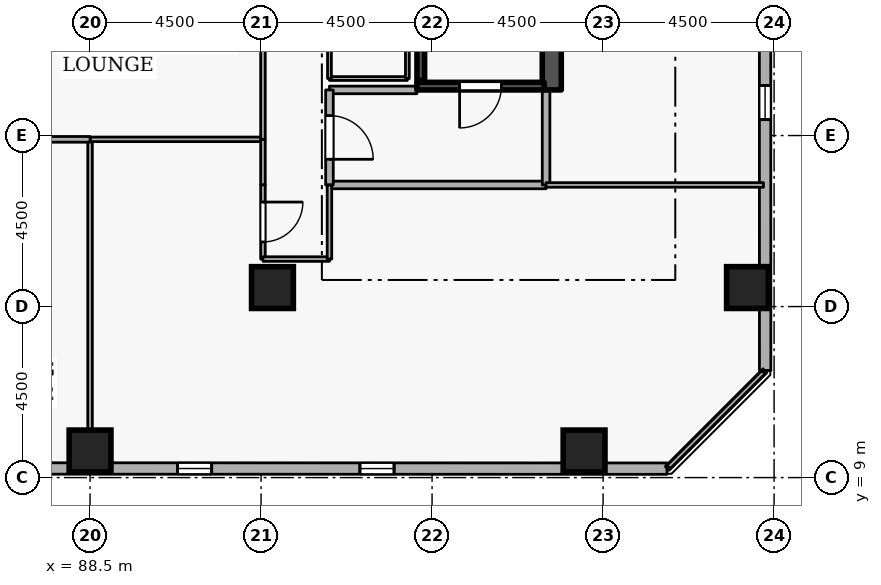
"""IFC4 building model, lengths in metres.
Left out: names, types, materials, properties, quantities, classifications, styles, units other than length and angle.
Written with IfcOpenShell. Run it as: python <this file> out.ifc"""

import sys

from ifc_helpers import new_model, si_unit, direction, frame, frame_2d, origin, origin_2d, place, context, subcontext, project, spatial, rectangle, extrude, element, fill, save


model = new_model("IFC4")
c1 = context("Model", 3, precision=1e-05, world=origin(), true_north=direction((0.0, 1.0)))
c2 = subcontext(c1, "Body", "Model", "MODEL_VIEW")
j1 = project(units=[si_unit("LENGTHUNIT", "METRE"), si_unit("PLANEANGLEUNIT", "RADIAN")], contexts=[c1])
p1 = place(None, origin())
s1 = spatial("IfcSite", under=j1, at=p1, CompositionType="ELEMENT")
p2 = place(p1, origin())
s2 = spatial("IfcBuilding", under=s1, at=p2, CompositionType="ELEMENT")
p3 = place(p2, frame((0.0, 0.0, 189.3)))
s3 = spatial("IfcBuildingStorey", under=s2, at=p3, CompositionType="ELEMENT", Elevation=189.3)
p4 = place(p3, frame((100.65, 19.2, 0.0), z_axis=(0.0, 0.0, 1.0), x_axis=(0.0, 1.0, 0.0)))
e1 = element("IfcWall", 1, at=p4, inside=s3, PredefinedType="SHEAR", context=c2, shape_type="SweptSolid", body=[
    extrude(rectangle(XDim=15.6, YDim=0.5, at=frame_2d((7.8, 0.0))), origin(), (0.0, 0.0, 1.0), 3.6),
])
for number, where, z_axis, x_axis in (
    (2, (105.8, 14.0, 0.0), (0.0, 0.0, 1.0), (1.0, 0.0, 0.0)),
    (3, (101.5, 9.7, 0.0), (0.0, 0.0, 1.0), (1.0, 0.0, 0.0)),
    (4, (88.5, 9.7, 0.0), (0.0, 0.0, 1.0), (1.0, 0.0, 0.0)),
    (5, (93.3, 14.0, 0.0), (0.0, 0.0, 1.0), (1.0, 0.0, 0.0)),
):
    element("IfcColumn", number, at=place(p3, frame(where, z_axis=z_axis, x_axis=x_axis)), inside=s3, PredefinedType="COLUMN", context=c2, shape_type="SweptSolid", body=[
        extrude(rectangle(XDim=1.1, YDim=1.1, at=origin_2d()), origin(), (0.0, 0.0, 1.0), 3.6),
    ])
p5 = place(p3, frame((69.801, 9.244, 0.0), z_axis=(0.0, 0.0, 1.0), x_axis=(0.999999969988, -0.000244999128, 0.0)))
e6 = element("IfcWall", 6, at=p5, inside=s3, PredefinedType="STANDARD", context=c2, shape_type="SweptSolid", body=[
    extrude(rectangle(XDim=33.881, YDim=0.3, at=frame_2d((16.94, 0.0))), origin(), (0.0, 0.0, 1.0), 2.7),
])
p6 = place(p5, frame((1.8, 0.0, 0.72)))
e7 = element("IfcOpeningElement", 7, at=p6, cuts=e6, PredefinedType="OPENING", context=c2, shape_type="SweptSolid", body=[
    extrude(rectangle(XDim=0.9, YDim=1.75, at=frame_2d((0.45, 0.875))), frame((0.0, 0.16, 0.0), z_axis=(0.0, -1.0, 0.0), x_axis=(1.0, 0.0, 0.0)), (0.0, 0.0, 1.0), 0.32),
])
p7 = place(p5, frame((11.4, 0.0, 0.72)))
e8 = element("IfcOpeningElement", 8, at=p7, cuts=e6, PredefinedType="OPENING", context=c2, shape_type="SweptSolid", body=[
    extrude(rectangle(XDim=0.9, YDim=1.75, at=frame_2d((0.45, 0.875))), frame((0.0, 0.16, 0.0), z_axis=(0.0, -1.0, 0.0), x_axis=(1.0, 0.0, 0.0)), (0.0, 0.0, 1.0), 0.32),
])
p8 = place(p5, frame((16.2, 0.0, 0.72)))
e9 = element("IfcOpeningElement", 9, at=p8, cuts=e6, PredefinedType="OPENING", context=c2, shape_type="SweptSolid", body=[
    extrude(rectangle(XDim=0.9, YDim=1.75, at=frame_2d((0.45, 0.875))), frame((0.0, 0.16, 0.0), z_axis=(0.0, -1.0, 0.0), x_axis=(1.0, 0.0, 0.0)), (0.0, 0.0, 1.0), 0.32),
])
p9 = place(p5, frame((21.0, 0.0, 0.72)))
e10 = element("IfcOpeningElement", 10, at=p9, cuts=e6, PredefinedType="OPENING", context=c2, shape_type="SweptSolid", body=[
    extrude(rectangle(XDim=0.9, YDim=1.75, at=frame_2d((0.45, 0.875))), frame((0.0, 0.16, 0.0), z_axis=(0.0, -1.0, 0.0), x_axis=(1.0, 0.0, 0.0)), (0.0, 0.0, 1.0), 0.32),
])
p10 = place(p5, frame((25.8, 0.0, 0.72)))
e11 = element("IfcOpeningElement", 11, at=p10, cuts=e6, PredefinedType="OPENING", context=c2, shape_type="SweptSolid", body=[
    extrude(rectangle(XDim=0.9, YDim=1.75, at=frame_2d((0.45, 0.875))), frame((0.0, 0.16, 0.0), z_axis=(0.0, -1.0, 0.0), x_axis=(1.0, 0.0, 0.0)), (0.0, 0.0, 1.0), 0.32),
])
p11 = place(p3, frame((106.265, 11.819, 0.0), z_axis=(0.0, 0.0, 1.0), x_axis=(-0.000244999128, 0.999999969988, 0.0)))
e12 = element("IfcWall", 12, at=p11, inside=s3, PredefinedType="STANDARD", context=c2, shape_type="SweptSolid", body=[
    extrude(rectangle(XDim=33.881, YDim=0.3, at=frame_2d((16.94, 0.0))), origin(), (0.0, 0.0, 1.0), 2.7),
])
p12 = place(p11, frame((6.6, 0.0, 0.72)))
e13 = element("IfcOpeningElement", 13, at=p12, cuts=e12, PredefinedType="OPENING", context=c2, shape_type="SweptSolid", body=[
    extrude(rectangle(XDim=0.9, YDim=1.75, at=frame_2d((0.45, 0.875))), frame((0.0, 0.16, 0.0), z_axis=(0.0, -1.0, 0.0), x_axis=(1.0, 0.0, 0.0)), (0.0, 0.0, 1.0), 0.32),
])
p13 = place(p11, frame((11.4, 0.0, 0.72)))
e14 = element("IfcOpeningElement", 14, at=p13, cuts=e12, PredefinedType="OPENING", context=c2, shape_type="SweptSolid", body=[
    extrude(rectangle(XDim=0.9, YDim=1.75, at=frame_2d((0.45, 0.875))), frame((0.0, 0.16, 0.0), z_axis=(0.0, -1.0, 0.0), x_axis=(1.0, 0.0, 0.0)), (0.0, 0.0, 1.0), 0.32),
])
p14 = place(p11, frame((21.0, 0.0, 0.72)))
e15 = element("IfcOpeningElement", 15, at=p14, cuts=e12, PredefinedType="OPENING", context=c2, shape_type="SweptSolid", body=[
    extrude(rectangle(XDim=0.9, YDim=1.75, at=frame_2d((0.45, 0.875))), frame((0.0, 0.16, 0.0), z_axis=(0.0, -1.0, 0.0), x_axis=(1.0, 0.0, 0.0)), (0.0, 0.0, 1.0), 0.32),
])
p15 = place(p11, frame((25.8, 0.0, 0.72)))
e16 = element("IfcOpeningElement", 16, at=p15, cuts=e12, PredefinedType="OPENING", context=c2, shape_type="SweptSolid", body=[
    extrude(rectangle(XDim=0.9, YDim=1.75, at=frame_2d((0.45, 0.875))), frame((0.0, 0.16, 0.0), z_axis=(0.0, -1.0, 0.0), x_axis=(1.0, 0.0, 0.0)), (0.0, 0.0, 1.0), 0.32),
])
p16 = place(p11, frame((30.6, 0.0, 0.72)))
e17 = element("IfcOpeningElement", 17, at=p16, cuts=e12, PredefinedType="OPENING", context=c2, shape_type="SweptSolid", body=[
    extrude(rectangle(XDim=0.9, YDim=1.75, at=frame_2d((0.45, 0.875))), frame((0.0, 0.16, 0.0), z_axis=(0.0, -1.0, 0.0), x_axis=(1.0, 0.0, 0.0)), (0.0, 0.0, 1.0), 0.32),
])
p17 = place(p3, frame((100.45, 19.3, 0.0), z_axis=(0.0, 0.0, 1.0), x_axis=(-1.0, 0.0, 0.0)))
e18 = element("IfcWall", 18, at=p17, inside=s3, PredefinedType="SHEAR", context=c2, shape_type="SweptSolid", body=[
    extrude(rectangle(XDim=3.35, YDim=0.2, at=frame_2d((1.675, 0.0))), origin(), (0.0, 0.0, 1.0), 3.6),
])
p18 = place(p17, frame((1.125, 0.0, 0.0)))
e19 = element("IfcOpeningElement", 19, at=p18, cuts=e18, PredefinedType="OPENING", context=c2, shape_type="SweptSolid", body=[
    extrude(rectangle(XDim=1.1, YDim=2.1, at=frame_2d((0.55, 1.05))), frame((0.0, 0.11, 0.0), z_axis=(0.0, -1.0, 0.0), x_axis=(1.0, 0.0, 0.0)), (0.0, 0.0, 1.0), 0.22),
])
p19 = place(p3, frame((97.203, 26.55, 0.0), z_axis=(0.0, 0.0, 1.0), x_axis=(0.0, -1.0, 0.0)))
e20 = element("IfcWall", 20, at=p19, inside=s3, PredefinedType="SHEAR", context=c2, shape_type="SweptSolid", body=[
    extrude(rectangle(XDim=7.1, YDim=0.2, at=frame_2d((3.55, 0.0))), origin(), (0.0, 0.0, 1.0), 3.6),
])
p20 = place(p3, frame((94.8, 16.7, 0.0), z_axis=(0.0, 0.0, 1.0), x_axis=(1.0, 0.0, 0.0)))
e21 = element("IfcWall", 21, at=p20, inside=s3, PredefinedType="STANDARD", context=c2, shape_type="SweptSolid", body=[
    extrude(rectangle(XDim=5.7, YDim=0.2, at=frame_2d((2.85, 0.0))), origin(), (0.0, 0.0, 1.0), 3.34),
])
p21 = place(p3, frame((100.5, 16.7, 0.0), z_axis=(0.0, 0.0, 1.0), x_axis=(0.0, 1.0, 0.0)))
e22 = element("IfcWall", 22, at=p21, inside=s3, PredefinedType="STANDARD", context=c2, shape_type="SweptSolid", body=[
    extrude(rectangle(XDim=2.5, YDim=0.2, at=frame_2d((1.25, 0.0))), origin(), (0.0, 0.0, 1.0), 3.34),
])
p22 = place(p3, frame((97.1, 19.2, 0.0), z_axis=(0.0, 0.0, 1.0), x_axis=(-1.0, 0.0, 0.0)))
e23 = element("IfcWall", 23, at=p22, inside=s3, PredefinedType="STANDARD", context=c2, shape_type="SweptSolid", body=[
    extrude(rectangle(XDim=2.3, YDim=0.2, at=frame_2d((1.15, 0.0))), origin(), (0.0, 0.0, 1.0), 2.545),
])
p23 = place(p3, frame((94.8, 19.2, 0.0), z_axis=(0.0, 0.0, 1.0), x_axis=(0.0, -1.0, 0.0)))
e24 = element("IfcWall", 24, at=p23, inside=s3, PredefinedType="STANDARD", context=c2, shape_type="SweptSolid", body=[
    extrude(rectangle(XDim=2.5, YDim=0.2, at=frame_2d((1.25, 0.0))), origin(), (0.0, 0.0, 1.0), 3.34),
])
p24 = place(p23, frame((0.675, 0.0, 0.0)))
e25 = element("IfcOpeningElement", 25, at=p24, cuts=e24, PredefinedType="OPENING", context=c2, shape_type="SweptSolid", body=[
    extrude(rectangle(XDim=1.15, YDim=2.1, at=frame_2d((0.575, 1.05))), frame((0.0, 0.11, 0.0), z_axis=(0.0, -1.0, 0.0), x_axis=(1.0, 0.0, 0.0)), (0.0, 0.0, 1.0), 0.22),
])
p25 = place(p3, frame((94.8, 19.5, 0.0), z_axis=(0.0, 0.0, 1.0), x_axis=(1.0, 0.0, 0.0)))
e26 = element("IfcWall", 26, at=p25, inside=s3, PredefinedType="PARTITIONING", context=c2, shape_type="SweptSolid", body=[
    extrude(rectangle(XDim=2.05, YDim=0.1, at=frame_2d((1.025, 0.0))), origin(), (0.0, 0.0, 1.0), 2.545),
])
p26 = place(p3, frame((96.85, 19.5, 0.0), z_axis=(0.0, 0.0, 1.0), x_axis=(0.0, 1.0, 0.0)))
e27 = element("IfcWall", 27, at=p26, inside=s3, PredefinedType="PARTITIONING", context=c2, shape_type="SweptSolid", body=[
    extrude(rectangle(XDim=2.6, YDim=0.1, at=frame_2d((1.3, 0.0))), origin(), (0.0, 0.0, 1.0), 3.34),
])
p27 = place(p3, frame((94.8, 22.1, 0.0), z_axis=(0.0, 0.0, 1.0), x_axis=(0.0, -1.0, 0.0)))
e28 = element("IfcWall", 28, at=p27, inside=s3, PredefinedType="PARTITIONING", context=c2, shape_type="SweptSolid", body=[
    extrude(rectangle(XDim=2.6, YDim=0.1, at=frame_2d((1.3, 0.0))), origin(), (0.0, 0.0, 1.0), 3.34),
])
p28 = place(p27, frame((0.825, 0.0, 0.0)))
e29 = element("IfcOpeningElement", 29, at=p28, cuts=e28, PredefinedType="OPENING", context=c2, shape_type="SweptSolid", body=[
    extrude(rectangle(XDim=0.95, YDim=2.1, at=frame_2d((0.475, 1.05))), frame((0.0, 0.06, 0.0), z_axis=(0.0, -1.0, 0.0), x_axis=(1.0, 0.0, 0.0)), (0.0, 0.0, 1.0), 0.12),
])
p29 = place(p3, frame((88.5, 9.28, 0.0), z_axis=(0.0, 0.0, 1.0), x_axis=(0.0, 1.0, 0.0)))
e30 = element("IfcWall", 30, at=p29, inside=s3, PredefinedType="PARTITIONING", context=c2, shape_type="SweptSolid", body=[
    extrude(rectangle(XDim=8.62, YDim=0.12, at=frame_2d((4.31, 0.0))), origin(), (0.0, 0.0, 1.0), 2.878),
])
p30 = place(p3, frame((88.5, 17.9, 0.0), z_axis=(0.0, 0.0, 1.0), x_axis=(1.0, 0.0, 0.0)))
e31 = element("IfcWall", 31, at=p30, inside=s3, PredefinedType="PARTITIONING", context=c2, shape_type="SweptSolid", body=[
    extrude(rectangle(XDim=4.55, YDim=0.12, at=frame_2d((2.275, 0.0))), origin(), (0.0, 0.0, 1.0), 3.34),
])
p31 = place(p3, frame((93.05, 17.9, 0.0), z_axis=(0.0, 0.0, 1.0), x_axis=(0.0, -1.0, 0.0)))
e32 = element("IfcWall", 32, at=p31, inside=s3, PredefinedType="PARTITIONING", context=c2, shape_type="SweptSolid", body=[
    extrude(rectangle(XDim=1.2, YDim=0.12, at=frame_2d((0.6, 0.0))), origin(), (0.0, 0.0, 1.0), 3.34),
])
p32 = place(p3, frame((93.05, 16.7, 0.0), z_axis=(0.0, 0.0, 1.0), x_axis=(0.0, -1.0, 0.0)))
e33 = element("IfcWall", 33, at=p32, inside=s3, PredefinedType="PARTITIONING", context=c2, shape_type="SweptSolid", body=[
    extrude(rectangle(XDim=1.95, YDim=0.12, at=frame_2d((0.975, 0.0))), origin(), (0.0, 0.0, 1.0), 3.34),
])
p33 = place(p32, frame((0.45, 0.0, 0.0)))
e34 = element("IfcOpeningElement", 34, at=p33, cuts=e33, PredefinedType="OPENING", context=c2, shape_type="SweptSolid", body=[
    extrude(rectangle(XDim=1.05, YDim=2.1, at=frame_2d((0.525, 1.05))), frame((0.0, 0.07, 0.0), z_axis=(0.0, -1.0, 0.0), x_axis=(1.0, 0.0, 0.0)), (0.0, 0.0, 1.0), 0.14),
])
p34 = place(p3, frame((93.05, 14.75, 0.0), z_axis=(0.0, 0.0, 1.0), x_axis=(1.0, 0.0, 0.0)))
e35 = element("IfcWall", 35, at=p34, inside=s3, PredefinedType="PARTITIONING", context=c2, shape_type="SweptSolid", body=[
    extrude(rectangle(XDim=1.75, YDim=0.12, at=frame_2d((0.875, 0.0))), origin(), (0.0, 0.0, 1.0), 3.34),
])
p35 = place(p3, frame((94.8, 14.75, 0.0), z_axis=(0.0, 0.0, 1.0), x_axis=(0.0, 1.0, 0.0)))
e36 = element("IfcWall", 36, at=p35, inside=s3, PredefinedType="PARTITIONING", context=c2, shape_type="SweptSolid", body=[
    extrude(rectangle(XDim=1.95, YDim=0.12, at=frame_2d((0.975, 0.0))), origin(), (0.0, 0.0, 1.0), 3.34),
])
p36 = place(p3, frame((100.5, 16.7, 0.0), z_axis=(0.0, 0.0, 1.0), x_axis=(1.0, 0.0, 0.0)))
e37 = element("IfcWall", 37, at=p36, inside=s3, PredefinedType="PARTITIONING", context=c2, shape_type="SweptSolid", body=[
    extrude(rectangle(XDim=5.72, YDim=0.12, at=frame_2d((2.86, 0.0))), origin(), (0.0, 0.0, 1.0), 3.34),
])
p37 = place(p3, frame((106.22, 11.775, 0.0), z_axis=(0.0, 0.0, 1.0), x_axis=(-0.707106781187, -0.707106781187, 0.0)))
e38 = element("IfcWall", 38, at=p37, inside=s3, PredefinedType="PARTITIONING", context=c2, shape_type="SweptSolid", body=[
    extrude(rectangle(XDim=3.528, YDim=0.12, at=frame_2d((1.764, 0.0))), origin(), (0.0, 0.0, 1.0), 3.34),
])
p38 = place(p3, frame((83.95, 17.9, 0.0), z_axis=(0.0, 0.0, 1.0), x_axis=(1.0, 0.0, 0.0)))
e39 = element("IfcWall", 39, at=p38, inside=s3, PredefinedType="PARTITIONING", context=c2, shape_type="SweptSolid", body=[
    extrude(rectangle(XDim=4.55, YDim=0.15, at=frame_2d((2.275, 0.0))), origin(), (0.0, 0.0, 1.0), 3.34),
])
p39 = place(p3, frame((93.05, 22.4, 0.0), z_axis=(0.0, 0.0, 1.0), x_axis=(0.0, -1.0, 0.0)))
e40 = element("IfcWall", 40, at=p39, inside=s3, PredefinedType="PARTITIONING", context=c2, shape_type="SweptSolid", body=[
    extrude(rectangle(XDim=4.5, YDim=0.12, at=frame_2d((2.25, 0.0))), origin(), (0.0, 0.0, 1.0), 3.34),
])
p40 = place(p9, origin())
e41 = element("IfcWindow", 41, at=p40, inside=s3, PartitioningType="SINGLE_PANEL", PredefinedType="WINDOW", context=c2, shape_type="SweptSolid", body=[
    extrude(rectangle(XDim=0.9, YDim=1.75, at=frame_2d((0.45, 0.875))), frame((0.0, 0.03, 0.0), z_axis=(0.0, -1.0, 0.0), x_axis=(1.0, 0.0, 0.0)), (0.0, 0.0, 1.0), 0.06),
])
fill(e10, e41)
p41 = place(p10, origin())
e42 = element("IfcWindow", 42, at=p41, inside=s3, PartitioningType="SINGLE_PANEL", PredefinedType="WINDOW", context=c2, shape_type="SweptSolid", body=[
    extrude(rectangle(XDim=0.9, YDim=1.75, at=frame_2d((0.45, 0.875))), frame((0.0, 0.03, 0.0), z_axis=(0.0, -1.0, 0.0), x_axis=(1.0, 0.0, 0.0)), (0.0, 0.0, 1.0), 0.06),
])
fill(e11, e42)
p42 = place(p12, origin())
e43 = element("IfcWindow", 43, at=p42, inside=s3, PartitioningType="SINGLE_PANEL", PredefinedType="WINDOW", context=c2, shape_type="SweptSolid", body=[
    extrude(rectangle(XDim=0.9, YDim=1.75, at=frame_2d((0.45, 0.875))), frame((0.0, 0.03, 0.0), z_axis=(0.0, -1.0, 0.0), x_axis=(1.0, 0.0, 0.0)), (0.0, 0.0, 1.0), 0.06),
])
fill(e13, e43)
p43 = place(p18, origin())
e44 = element("IfcDoor", 44, at=p43, inside=s3, OperationType="SINGLE_SWING_RIGHT", PredefinedType="DOOR", context=c2, shape_type="SweptSolid", body=[
    extrude(rectangle(XDim=1.1, YDim=2.1, at=frame_2d((0.55, 1.05))), frame((0.0, 0.025, 0.0), z_axis=(0.0, -1.0, 0.0), x_axis=(1.0, 0.0, 0.0)), (0.0, 0.0, 1.0), 0.05),
])
fill(e19, e44)
p44 = place(p24, origin())
e45 = element("IfcDoor", 45, at=p44, inside=s3, OperationType="SINGLE_SWING_RIGHT", PredefinedType="DOOR", context=c2, shape_type="SweptSolid", body=[
    extrude(rectangle(XDim=1.15, YDim=2.1, at=frame_2d((0.575, 1.05))), frame((0.0, 0.025, 0.0), z_axis=(0.0, -1.0, 0.0), x_axis=(1.0, 0.0, 0.0)), (0.0, 0.0, 1.0), 0.05),
])
fill(e25, e45)
p45 = place(p33, origin())
e46 = element("IfcDoor", 46, at=p45, inside=s3, OperationType="SINGLE_SWING_LEFT", PredefinedType="DOOR", context=c2, shape_type="SweptSolid", body=[
    extrude(rectangle(XDim=1.05, YDim=2.1, at=frame_2d((0.525, 1.05))), frame((0.0, 0.025, 0.0), z_axis=(0.0, -1.0, 0.0), x_axis=(1.0, 0.0, 0.0)), (0.0, 0.0, 1.0), 0.05),
])
fill(e34, e46)
save(model, sys.argv[1])
